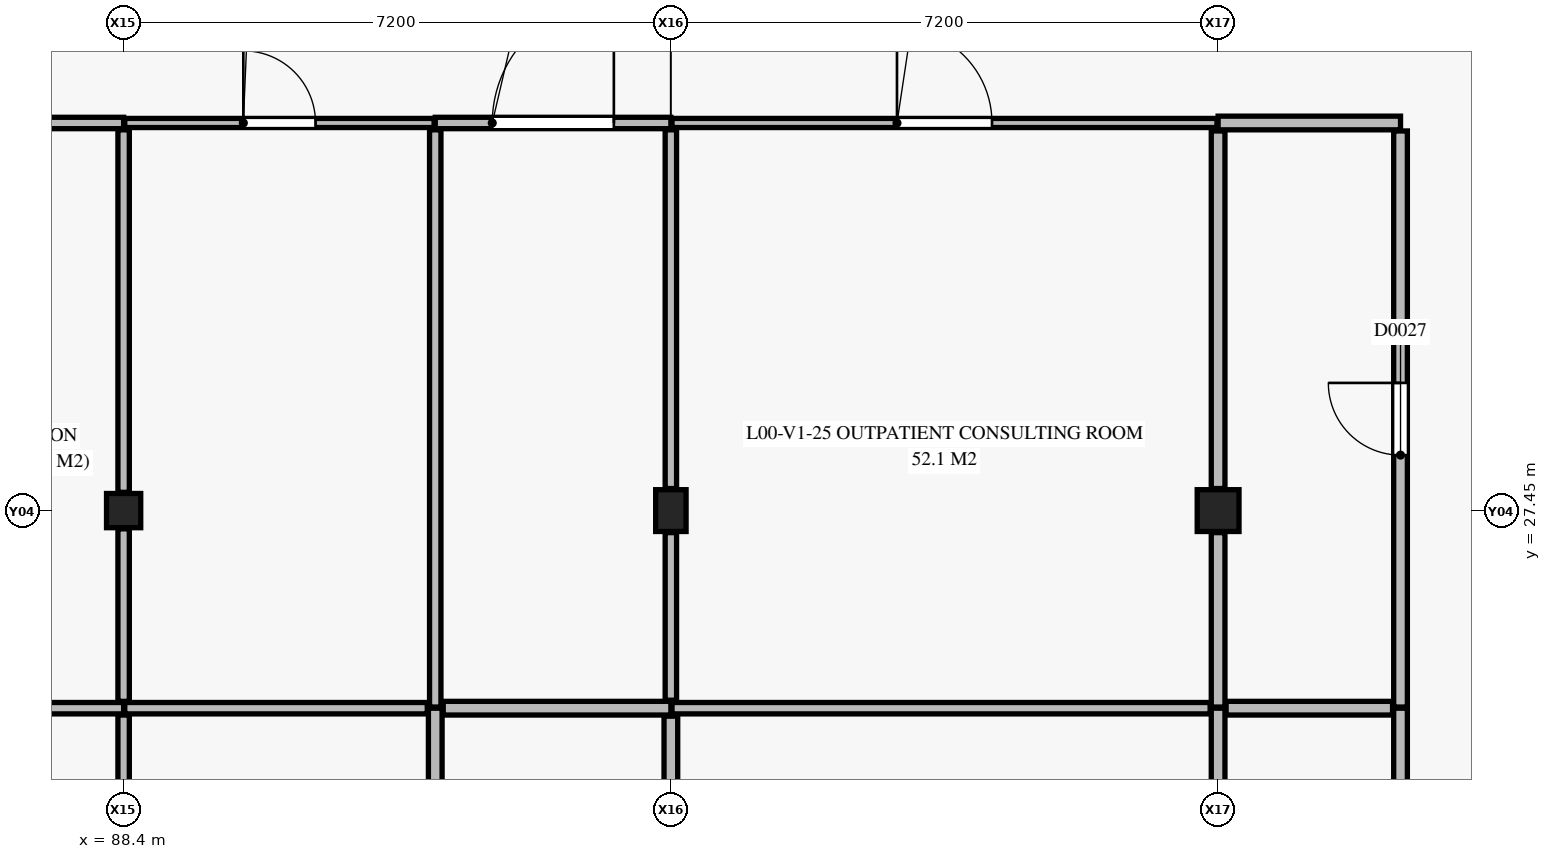
"""IFC4 building model, lengths in metres.
Left out: names, types, materials, properties, quantities, classifications, styles, units other than length and angle.
Written with IfcOpenShell. Run it as: python <this file> out.ifc"""

import sys

from ifc_helpers import new_model, si_unit, direction, frame, frame_2d, origin, origin_2d, place, context, subcontext, project, spatial, rectangle, extrude, element, fill, save


model = new_model("IFC4")
c1 = context("Model", 3, precision=1e-05, world=origin(), true_north=direction((0.0, 1.0)))
c2 = subcontext(c1, "Body", "Model", "MODEL_VIEW")
j1 = project(units=[si_unit("LENGTHUNIT", "METRE"), si_unit("PLANEANGLEUNIT", "RADIAN")], contexts=[c1])
p1 = place(None, origin())
s1 = spatial("IfcSite", under=j1, at=p1, CompositionType="ELEMENT")
p2 = place(p1, origin())
s2 = spatial("IfcBuilding", under=s1, at=p2, CompositionType="ELEMENT")
p3 = place(p2, origin())
s3 = spatial("IfcBuildingStorey", under=s2, at=p3, CompositionType="ELEMENT", Elevation=0.0)
p4 = place(p3, frame((88.4, 27.45, 0.0), z_axis=(0.0, 0.0, 1.0), x_axis=(1.0, 0.0, 0.0)))
e1 = element("IfcColumn", 1, at=p4, inside=s3, PredefinedType="COLUMN", context=c2, shape_type="SweptSolid", body=[
    extrude(rectangle(XDim=0.45, YDim=0.45, at=origin_2d()), origin(), (0.0, 0.0, 1.0), 4.65),
])
p5 = place(p3, frame((95.6, 27.45, 0.0), z_axis=(0.0, 0.0, 1.0), x_axis=(1.0, 0.0, 0.0)))
e2 = element("IfcColumn", 2, at=p5, inside=s3, PredefinedType="COLUMN", context=c2, shape_type="SweptSolid", body=[
    extrude(rectangle(XDim=0.4, YDim=0.55, at=origin_2d()), origin(), (0.0, 0.0, 1.0), 4.65),
])
p6 = place(p3, frame((102.8, 27.45, 0.0), z_axis=(0.0, 0.0, 1.0), x_axis=(1.0, 0.0, 0.0)))
e3 = element("IfcColumn", 3, at=p6, inside=s3, PredefinedType="COLUMN", context=c2, shape_type="SweptSolid", body=[
    extrude(rectangle(XDim=0.55, YDim=0.55, at=origin_2d()), origin(), (0.0, 0.0, 1.0), 4.8),
])
p7 = place(p3, frame((105.2, 17.85, 0.0), z_axis=(0.0, 0.0, 1.0), x_axis=(0.0, 1.0, 0.0)))
e4 = element("IfcWall", 4, at=p7, inside=s3, PredefinedType="PLUMBINGWALL", context=c2, shape_type="SweptSolid", body=[
    extrude(rectangle(XDim=7.0, YDim=0.18, at=frame_2d((3.5, 0.0))), origin(), (0.0, 0.0, 1.0), 3.955),
])
p8 = place(p7, frame((3.025, 0.0, 0.0)))
e5 = element("IfcOpeningElement", 5, at=p8, cuts=e4, PredefinedType="OPENING", context=c2, shape_type="SweptSolid", body=[
    extrude(rectangle(XDim=0.95, YDim=2.1, at=frame_2d((0.475, 1.05))), frame((0.0, 0.1, 0.0), z_axis=(0.0, -1.0, 0.0), x_axis=(1.0, 0.0, 0.0)), (0.0, 0.0, 1.0), 0.2),
])
p9 = place(p3, frame((102.8, 32.55, 0.0), z_axis=(0.0, 0.0, 1.0), x_axis=(1.0, 0.0, 0.0)))
e6 = element("IfcWall", 6, at=p9, inside=s3, PredefinedType="PLUMBINGWALL", context=c2, shape_type="SweptSolid", body=[
    extrude(rectangle(XDim=2.4, YDim=0.18, at=frame_2d((1.2, 0.0))), origin(), (0.0, 0.0, 1.0), 3.955),
])
p10 = place(p3, frame((105.2, 24.865, 0.0), z_axis=(0.0, 0.0, 1.0), x_axis=(0.0, 1.0, 0.0)))
e7 = element("IfcWall", 7, at=p10, inside=s3, PredefinedType="PLUMBINGWALL", context=c2, shape_type="SweptSolid", body=[
    extrude(rectangle(XDim=7.58, YDim=0.18, at=frame_2d((3.79, 0.0))), origin(), (0.0, 0.0, 1.0), 3.955),
])
p11 = place(p10, frame((3.315, 0.0, 0.0)))
e8 = element("IfcOpeningElement", 8, at=p11, cuts=e7, PredefinedType="OPENING", context=c2, shape_type="SweptSolid", body=[
    extrude(rectangle(XDim=0.95, YDim=2.1, at=frame_2d((0.475, 1.05))), frame((0.0, 0.1, 0.0), z_axis=(0.0, -1.0, 0.0), x_axis=(1.0, 0.0, 0.0)), (0.0, 0.0, 1.0), 0.2),
])
p12 = place(p3, frame((84.665, 32.55, 0.0), z_axis=(0.0, 0.0, 1.0), x_axis=(1.0, 0.0, 0.0)))
e9 = element("IfcWall", 9, at=p12, inside=s3, PredefinedType="PARTITIONING", context=c2, shape_type="SweptSolid", body=[
    extrude(rectangle(XDim=3.735, YDim=0.15, at=frame_2d((1.867, 0.0))), origin(), (0.0, 0.0, 1.0), 4.55),
])
p13 = place(p12, frame((1.067, 0.0, 0.0)))
e10 = element("IfcOpeningElement", 10, at=p13, cuts=e9, PredefinedType="OPENING", context=c2, shape_type="SweptSolid", body=[
    extrude(rectangle(XDim=1.6, YDim=2.25, at=frame_2d((0.8, 1.125))), frame((0.0, 0.085, 0.0), z_axis=(0.0, -1.0, 0.0), x_axis=(1.0, 0.0, 0.0)), (0.0, 0.0, 1.0), 0.17),
])
p14 = place(p3, frame((92.5, 32.55, 0.0), z_axis=(0.0, 0.0, 1.0), x_axis=(1.0, 0.0, 0.0)))
e11 = element("IfcWall", 11, at=p14, inside=s3, PredefinedType="PARTITIONING", context=c2, shape_type="SweptSolid", body=[
    extrude(rectangle(XDim=3.1, YDim=0.15, at=frame_2d((1.55, 0.0))), origin(), (0.0, 0.0, 1.0), 4.55),
])
p15 = place(p14, frame((0.75, 0.0, 0.0)))
e12 = element("IfcOpeningElement", 12, at=p15, cuts=e11, PredefinedType="OPENING", context=c2, shape_type="SweptSolid", body=[
    extrude(rectangle(XDim=1.6, YDim=2.25, at=frame_2d((0.8, 1.125))), frame((0.0, 0.085, 0.0), z_axis=(0.0, -1.0, 0.0), x_axis=(1.0, 0.0, 0.0)), (0.0, 0.0, 1.0), 0.17),
])
p16 = place(p3, frame((88.415, 32.55, 0.0), z_axis=(0.0, 0.0, 1.0), x_axis=(1.0, 0.0, 0.0)))
e13 = element("IfcWall", 13, at=p16, inside=s3, PredefinedType="PARTITIONING", context=c2, shape_type="SweptSolid", body=[
    extrude(rectangle(XDim=4.07, YDim=0.12, at=frame_2d((2.035, 0.0))), origin(), (0.0, 0.0, 1.0), 4.55),
])
p17 = place(p16, frame((1.56, 0.0, 0.0)))
e14 = element("IfcOpeningElement", 14, at=p17, cuts=e13, PredefinedType="OPENING", context=c2, shape_type="SweptSolid", body=[
    extrude(rectangle(XDim=0.95, YDim=2.1, at=frame_2d((0.475, 1.05))), frame((0.0, 0.07, 0.0), z_axis=(0.0, -1.0, 0.0), x_axis=(1.0, 0.0, 0.0)), (0.0, 0.0, 1.0), 0.14),
])
p18 = place(p3, frame((95.615, 32.55, 0.0), z_axis=(0.0, 0.0, 1.0), x_axis=(1.0, 0.0, 0.0)))
e15 = element("IfcWall", 15, at=p18, inside=s3, PredefinedType="PARTITIONING", context=c2, shape_type="SweptSolid", body=[
    extrude(rectangle(XDim=7.17, YDim=0.12, at=frame_2d((3.585, 0.0))), origin(), (0.0, 0.0, 1.0), 3.955),
])
p19 = place(p18, frame((2.96, 0.0, 0.0)))
e16 = element("IfcOpeningElement", 16, at=p19, cuts=e15, PredefinedType="OPENING", context=c2, shape_type="SweptSolid", body=[
    extrude(rectangle(XDim=1.25, YDim=2.15, at=frame_2d((0.625, 1.075))), frame((0.0, 0.07, 0.0), z_axis=(0.0, -1.0, 0.0), x_axis=(1.0, 0.0, 0.0)), (0.0, 0.0, 1.0), 0.14),
])
p20 = place(p3, frame((92.5, 17.955, 0.0), z_axis=(0.0, 0.0, 1.0), x_axis=(0.0, 1.0, 0.0)))
e17 = element("IfcWall", 17, at=p20, inside=s3, PredefinedType="PLUMBINGWALL", context=c2, shape_type="SweptSolid", body=[
    extrude(rectangle(XDim=6.895, YDim=0.18, at=frame_2d((3.448, 0.0))), origin(), (0.0, 0.0, 1.0), 3.735),
])
p21 = place(p3, frame((92.605, 24.85, 0.0), z_axis=(0.0, 0.0, 1.0), x_axis=(1.0, 0.0, 0.0)))
e18 = element("IfcWall", 18, at=p21, inside=s3, PredefinedType="PLUMBINGWALL", context=c2, shape_type="SweptSolid", body=[
    extrude(rectangle(XDim=2.995, YDim=0.18, at=frame_2d((1.498, 0.0))), origin(), (0.0, 0.0, 1.0), 4.55),
])
p22 = place(p3, frame((95.6, 20.565, 0.0), z_axis=(0.0, 0.0, 1.0), x_axis=(0.0, 1.0, 0.0)))
e19 = element("IfcWall", 19, at=p22, inside=s3, PredefinedType="PLUMBINGWALL", context=c2, shape_type="SweptSolid", body=[
    extrude(rectangle(XDim=4.18, YDim=0.18, at=frame_2d((2.09, 0.0))), origin(), (0.0, 0.0, 1.0), 4.55),
])
p23 = place(p3, frame((102.8, 20.565, 0.0), z_axis=(0.0, 0.0, 1.0), x_axis=(0.0, 1.0, 0.0)))
e20 = element("IfcWall", 20, at=p23, inside=s3, PredefinedType="PLUMBINGWALL", context=c2, shape_type="SweptSolid", body=[
    extrude(rectangle(XDim=4.285, YDim=0.18, at=frame_2d((2.143, 0.0))), origin(), (0.0, 0.0, 1.0), 3.835),
])
p24 = place(p3, frame((102.905, 24.85, 0.0), z_axis=(0.0, 0.0, 1.0), x_axis=(1.0, 0.0, 0.0)))
e21 = element("IfcWall", 21, at=p24, inside=s3, PredefinedType="PLUMBINGWALL", context=c2, shape_type="SweptSolid", body=[
    extrude(rectangle(XDim=2.19, YDim=0.18, at=frame_2d((1.095, 0.0))), origin(), (0.0, 0.0, 1.0), 3.835),
])
p25 = place(p3, frame((102.8, 24.865, 0.0), z_axis=(0.0, 0.0, 1.0), x_axis=(0.0, 1.0, 0.0)))
e22 = element("IfcWall", 22, at=p25, inside=s3, PredefinedType="PLUMBINGWALL", context=c2, shape_type="SweptSolid", body=[
    extrude(rectangle(XDim=2.295, YDim=0.18, at=frame_2d((1.147, 0.0))), origin(), (0.0, 0.0, 1.0), 3.835),
])
p26 = place(p3, frame((102.8, 27.74, 0.0), z_axis=(0.0, 0.0, 1.0), x_axis=(0.0, 1.0, 0.0)))
e23 = element("IfcWall", 23, at=p26, inside=s3, PredefinedType="PLUMBINGWALL", context=c2, shape_type="SweptSolid", body=[
    extrude(rectangle(XDim=4.705, YDim=0.18, at=frame_2d((2.353, 0.0))), origin(), (0.0, 0.0, 1.0), 3.955),
])
p27 = place(p3, frame((84.755, 24.85, 0.0), z_axis=(0.0, 0.0, 1.0), x_axis=(1.0, 0.0, 0.0)))
e24 = element("IfcWall", 24, at=p27, inside=s3, PredefinedType="PARTITIONING", context=c2, shape_type="SweptSolid", body=[
    extrude(rectangle(XDim=3.645, YDim=0.15, at=frame_2d((1.823, 0.0))), origin(), (0.0, 0.0, 1.0), 4.55),
])
p28 = place(p3, frame((95.615, 24.85, 0.0), z_axis=(0.0, 0.0, 1.0), x_axis=(1.0, 0.0, 0.0)))
e25 = element("IfcWall", 25, at=p28, inside=s3, PredefinedType="PARTITIONING", context=c2, shape_type="SweptSolid", body=[
    extrude(rectangle(XDim=7.08, YDim=0.15, at=frame_2d((3.54, 0.0))), origin(), (0.0, 0.0, 1.0), 3.835),
])
p29 = place(p3, frame((88.4, 24.94, 0.0), z_axis=(0.0, 0.0, 1.0), x_axis=(0.0, 1.0, 0.0)))
e26 = element("IfcWall", 26, at=p29, inside=s3, PredefinedType="PARTITIONING", context=c2, shape_type="SweptSolid", body=[
    extrude(rectangle(XDim=2.27, YDim=0.15, at=frame_2d((1.135, 0.0))), origin(), (0.0, 0.0, 1.0), 4.55),
])
p30 = place(p3, frame((88.4, 27.69, 0.0), z_axis=(0.0, 0.0, 1.0), x_axis=(0.0, 1.0, 0.0)))
e27 = element("IfcWall", 27, at=p30, inside=s3, PredefinedType="PARTITIONING", context=c2, shape_type="SweptSolid", body=[
    extrude(rectangle(XDim=4.77, YDim=0.15, at=frame_2d((2.385, 0.0))), origin(), (0.0, 0.0, 1.0), 4.55),
])
p31 = place(p3, frame((88.4, 20.515, 0.0), z_axis=(0.0, 0.0, 1.0), x_axis=(0.0, 1.0, 0.0)))
e28 = element("IfcWall", 28, at=p31, inside=s3, PredefinedType="PARTITIONING", context=c2, shape_type="SweptSolid", body=[
    extrude(rectangle(XDim=4.245, YDim=0.15, at=frame_2d((2.123, 0.0))), origin(), (0.0, 0.0, 1.0), 4.55),
])
p32 = place(p3, frame((88.415, 24.85, 0.0), z_axis=(0.0, 0.0, 1.0), x_axis=(1.0, 0.0, 0.0)))
e29 = element("IfcWall", 29, at=p32, inside=s3, PredefinedType="PARTITIONING", context=c2, shape_type="SweptSolid", body=[
    extrude(rectangle(XDim=3.98, YDim=0.15, at=frame_2d((1.99, 0.0))), origin(), (0.0, 0.0, 1.0), 4.55),
])
p33 = place(p3, frame((92.5, 24.865, 0.0), z_axis=(0.0, 0.0, 1.0), x_axis=(0.0, 1.0, 0.0)))
e30 = element("IfcWall", 30, at=p33, inside=s3, PredefinedType="PARTITIONING", context=c2, shape_type="SweptSolid", body=[
    extrude(rectangle(XDim=7.595, YDim=0.15, at=frame_2d((3.797, 0.0))), origin(), (0.0, 0.0, 1.0), 4.55),
])
p34 = place(p3, frame((95.6, 24.955, 0.0), z_axis=(0.0, 0.0, 1.0), x_axis=(0.0, 1.0, 0.0)))
e31 = element("IfcWall", 31, at=p34, inside=s3, PredefinedType="PARTITIONING", context=c2, shape_type="SweptSolid", body=[
    extrude(rectangle(XDim=2.205, YDim=0.15, at=frame_2d((1.103, 0.0))), origin(), (0.0, 0.0, 1.0), 4.55),
])
p35 = place(p3, frame((95.6, 27.74, 0.0), z_axis=(0.0, 0.0, 1.0), x_axis=(0.0, 1.0, 0.0)))
e32 = element("IfcWall", 32, at=p35, inside=s3, PredefinedType="PARTITIONING", context=c2, shape_type="SweptSolid", body=[
    extrude(rectangle(XDim=4.72, YDim=0.15, at=frame_2d((2.36, 0.0))), origin(), (0.0, 0.0, 1.0), 4.55),
])
p36 = place(p17, origin())
e33 = element("IfcDoor", 33, at=p36, inside=s3, OperationType="SINGLE_SWING_LEFT", PredefinedType="DOOR", context=c2, shape_type="SweptSolid", body=[
    extrude(rectangle(XDim=0.95, YDim=2.1, at=frame_2d((0.475, 1.05))), frame((0.0, 0.025, 0.0), z_axis=(0.0, -1.0, 0.0), x_axis=(1.0, 0.0, 0.0)), (0.0, 0.0, 1.0), 0.05),
])
fill(e14, e33)
p37 = place(p15, origin())
e34 = element("IfcDoor", 34, at=p37, inside=s3, OperationType="SINGLE_SWING_RIGHT", PredefinedType="DOOR", context=c2, shape_type="SweptSolid", body=[
    extrude(rectangle(XDim=1.6, YDim=2.25, at=frame_2d((0.8, 1.125))), frame((0.0, 0.025, 0.0), z_axis=(0.0, -1.0, 0.0), x_axis=(1.0, 0.0, 0.0)), (0.0, 0.0, 1.0), 0.05),
])
fill(e12, e34)
p38 = place(p19, origin())
e35 = element("IfcDoor", 35, at=p38, inside=s3, OperationType="SINGLE_SWING_LEFT", PredefinedType="DOOR", context=c2, shape_type="SweptSolid", body=[
    extrude(rectangle(XDim=1.25, YDim=2.15, at=frame_2d((0.625, 1.075))), frame((0.0, 0.025, 0.0), z_axis=(0.0, -1.0, 0.0), x_axis=(1.0, 0.0, 0.0)), (0.0, 0.0, 1.0), 0.05),
])
fill(e16, e35)
p39 = place(p11, origin())
e36 = element("IfcDoor", 36, at=p39, inside=s3, OperationType="SINGLE_SWING_RIGHT", PredefinedType="DOOR", context=c2, shape_type="SweptSolid", body=[
    extrude(rectangle(XDim=0.95, YDim=2.1, at=frame_2d((0.475, 1.05))), frame((0.0, 0.025, 0.0), z_axis=(0.0, -1.0, 0.0), x_axis=(1.0, 0.0, 0.0)), (0.0, 0.0, 1.0), 0.05),
])
fill(e8, e36)
save(model, sys.argv[1])
